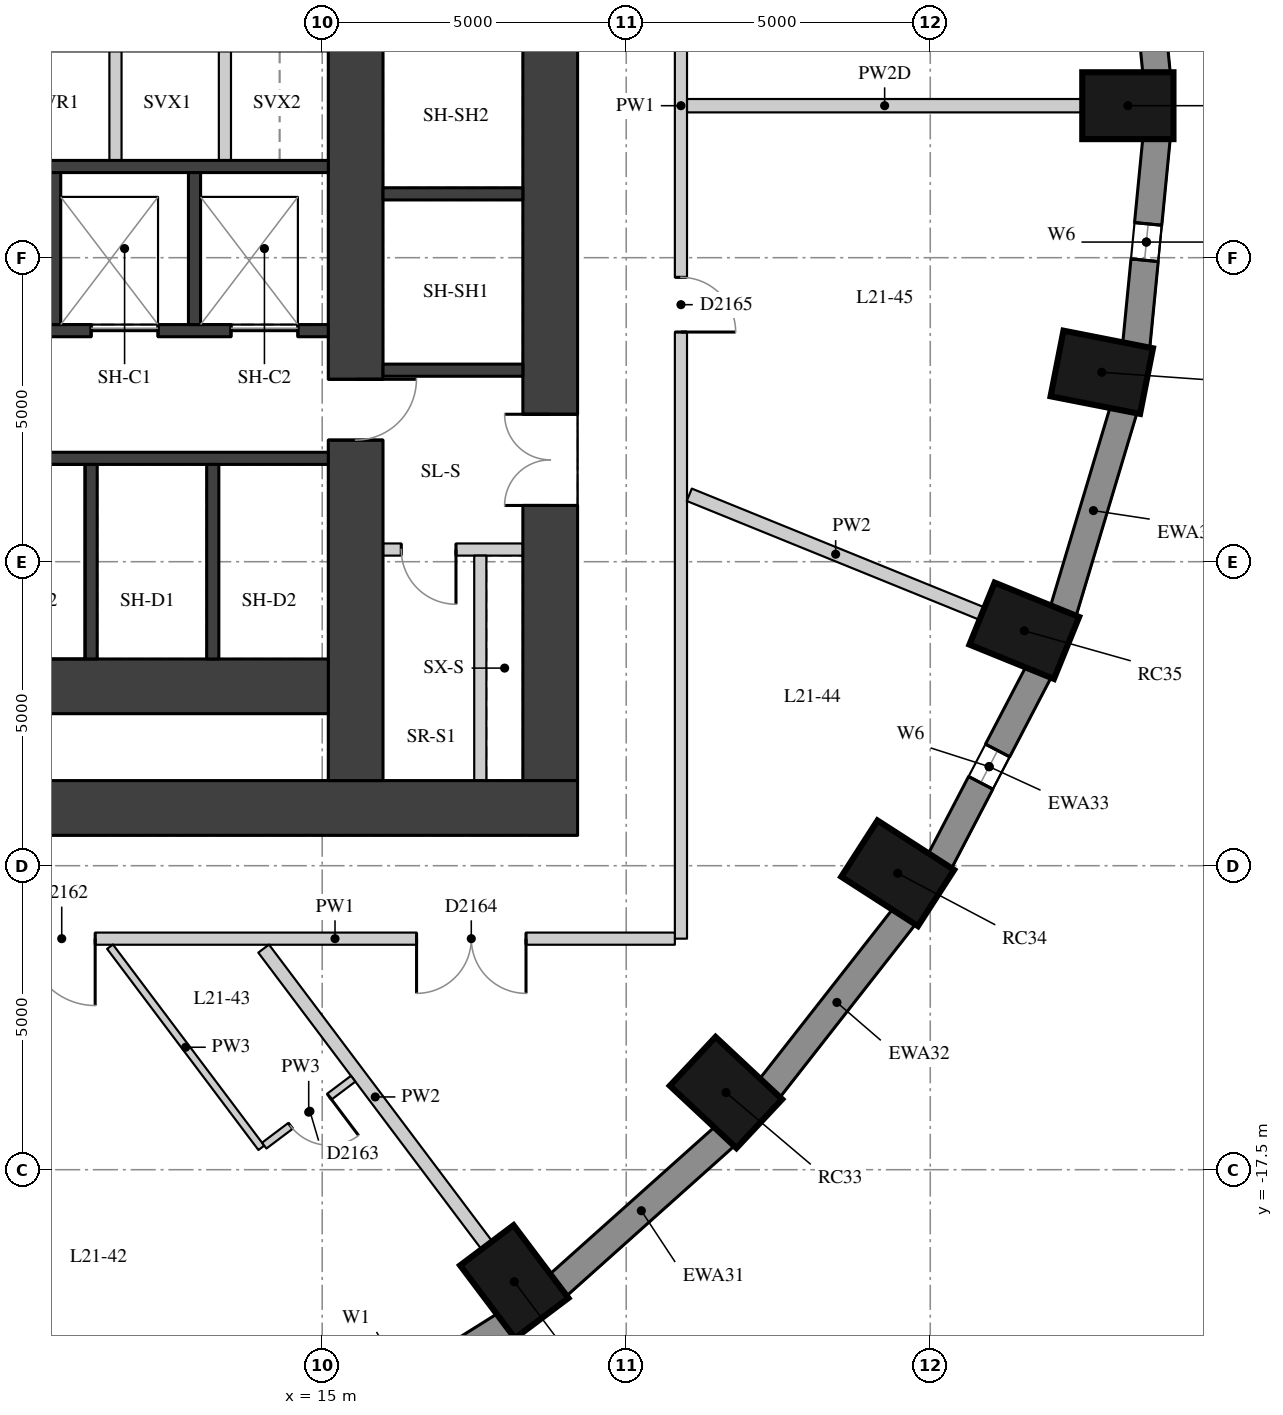
"""IFC4 building model, lengths in metres.
Left out: names, types, materials, properties, quantities, classifications, styles, units other than length and angle.
Written with IfcOpenShell. Run it as: python <this file> out.ifc"""

import sys

from ifc_helpers import new_model, si_unit, direction, frame, frame_2d, origin, origin_2d, place, context, subcontext, project, spatial, rectangle, extrude, element, fill, save


model = new_model("IFC4")
c1 = context("Model", 3, precision=1e-05, world=origin(), true_north=direction((0.0, 1.0)))
c2 = subcontext(c1, "Body", "Model", "MODEL_VIEW")
j1 = project(units=[si_unit("LENGTHUNIT", "METRE"), si_unit("PLANEANGLEUNIT", "RADIAN")], contexts=[c1])
p1 = place(None, origin())
s1 = spatial("IfcSite", under=j1, at=p1, CompositionType="ELEMENT")
p2 = place(p1, origin())
s2 = spatial("IfcBuilding", under=s1, at=p2, CompositionType="ELEMENT")
p3 = place(p2, frame((0.0, 0.0, 77.8)))
s3 = spatial("IfcBuildingStorey", under=s2, at=p3, CompositionType="ELEMENT", Elevation=77.8)
for number, where, z_axis, x_axis in (
    (1, (28.25, 0.0, 0.0), (0.0, 0.0, 1.0), (1.0, 0.0, 0.0)),
    (2, (18.159, -19.343, 0.0), (0.0, 0.0, 1.0), (0.601, -0.799, 0.0)),
    (3, (21.641, -16.23, 0.0), (0.0, 0.0, 1.0), (0.73, -0.683, 0.0)),
    (4, (24.465, -12.625, 0.0), (0.0, 0.0, 1.0), (0.841, -0.541, 0.0)),
    (5, (26.546, -8.636, 0.0), (0.0, 0.0, 1.0), (0.927, -0.376, 0.0)),
    (6, (27.821, -4.385, 0.0), (0.0, 0.0, 1.0), (0.981, -0.193, 0.0)),
):
    element("IfcColumn", number, at=place(p3, frame(where, z_axis=z_axis, x_axis=x_axis)), inside=s3, PredefinedType="COLUMN", context=c2, shape_type="SweptSolid", body=[
        extrude(rectangle(XDim=1.5, YDim=1.1, at=origin_2d()), origin(), (0.0, 0.0, 1.0), 3.3),
    ])
p4 = place(p3, frame((28.722, 0.53, 0.0), z_axis=(0.0, 0.0, 1.0), x_axis=(-0.097389581596, 0.995246336038, 0.0)))
e7 = element("IfcWall", 7, at=p4, inside=s3, PredefinedType="SOLIDWALL", context=c2, shape_type="SweptSolid", body=[
    extrude(rectangle(XDim=3.442, YDim=0.45, at=frame_2d((1.721, 0.0))), origin(), (0.0, 0.0, 1.0), 3.02),
])
p5 = place(p3, frame((14.817, -22.051, 0.0), z_axis=(0.0, 0.0, 1.0), x_axis=(0.847635480093, 0.530579016629, 0.0)))
e8 = element("IfcWall", 8, at=p5, inside=s3, PredefinedType="SOLIDWALL", context=c2, shape_type="SweptSolid", body=[
    extrude(rectangle(XDim=3.782, YDim=0.45, at=frame_2d((1.891, 0.0))), origin(), (0.0, 0.0, 1.0), 3.02),
])
p6 = place(p5, frame((0.791, 0.0, 0.4)))
e9 = element("IfcOpeningElement", 9, at=p6, cuts=e8, PredefinedType="OPENING", context=c2, shape_type="SweptSolid", body=[
    extrude(rectangle(XDim=2.2, YDim=1.75, at=frame_2d((1.1, 0.875))), frame((0.0, 0.235, 0.0), z_axis=(0.0, -1.0, 0.0), x_axis=(1.0, 0.0, 0.0)), (0.0, 0.0, 1.0), 0.47),
])
p7 = place(p3, frame((18.871, -19.407, 0.0), z_axis=(0.0, 0.0, 1.0), x_axis=(0.745526233716, 0.66647628228, 0.0)))
e10 = element("IfcWall", 10, at=p7, inside=s3, PredefinedType="SOLIDWALL", context=c2, shape_type="SweptSolid", body=[
    extrude(rectangle(XDim=3.697, YDim=0.45, at=frame_2d((1.848, 0.0))), origin(), (0.0, 0.0, 1.0), 3.02),
])
p8 = place(p3, frame((22.352, -16.17, 0.0), z_axis=(0.0, 0.0, 1.0), x_axis=(0.616661975264, 0.787228053529, 0.0)))
e11 = element("IfcWall", 11, at=p8, inside=s3, PredefinedType="SOLIDWALL", context=c2, shape_type="SweptSolid", body=[
    extrude(rectangle(XDim=3.61, YDim=0.45, at=frame_2d((1.805, 0.0))), origin(), (0.0, 0.0, 1.0), 3.02),
])
p9 = place(p3, frame((25.152, -12.437, 0.0), z_axis=(0.0, 0.0, 1.0), x_axis=(0.462492775226, 0.886623050041, 0.0)))
e12 = element("IfcWall", 12, at=p9, inside=s3, PredefinedType="SOLIDWALL", context=c2, shape_type="SweptSolid", body=[
    extrude(rectangle(XDim=3.532, YDim=0.45, at=frame_2d((1.766, 0.0))), origin(), (0.0, 0.0, 1.0), 3.02),
])
p10 = place(p9, frame((1.466, 0.0, 0.4)))
e13 = element("IfcOpeningElement", 13, at=p10, cuts=e12, PredefinedType="OPENING", context=c2, shape_type="SweptSolid", body=[
    extrude(rectangle(XDim=0.6, YDim=1.75, at=frame_2d((0.3, 0.875))), frame((0.0, 0.235, 0.0), z_axis=(0.0, -1.0, 0.0), x_axis=(1.0, 0.0, 0.0)), (0.0, 0.0, 1.0), 0.47),
])
p11 = place(p3, frame((27.185, -8.323, 0.0), z_axis=(0.0, 0.0, 1.0), x_axis=(0.287064133733, 0.957911364963, 0.0)))
e14 = element("IfcWall", 14, at=p11, inside=s3, PredefinedType="SOLIDWALL", context=c2, shape_type="SweptSolid", body=[
    extrude(rectangle(XDim=3.473, YDim=0.45, at=frame_2d((1.737, 0.0))), origin(), (0.0, 0.0, 1.0), 3.02),
])
p12 = place(p3, frame((28.387, -3.956, 0.0), z_axis=(0.0, 0.0, 1.0), x_axis=(0.097389581596, 0.995246336038, 0.0)))
e15 = element("IfcWall", 15, at=p12, inside=s3, PredefinedType="SOLIDWALL", context=c2, shape_type="SweptSolid", body=[
    extrude(rectangle(XDim=3.442, YDim=0.45, at=frame_2d((1.721, 0.0))), origin(), (0.0, 0.0, 1.0), 3.02),
])
p13 = place(p12, frame((1.421, 0.0, 0.4)))
e16 = element("IfcOpeningElement", 16, at=p13, cuts=e15, PredefinedType="OPENING", context=c2, shape_type="SweptSolid", body=[
    extrude(rectangle(XDim=0.6, YDim=1.75, at=frame_2d((0.3, 0.875))), frame((0.0, 0.235, 0.0), z_axis=(0.0, -1.0, 0.0), x_axis=(1.0, 0.0, 0.0)), (0.0, 0.0, 1.0), 0.47),
])
p14 = place(p3, frame((18.75, -11.1, 0.0), z_axis=(0.0, 0.0, 1.0), x_axis=(0.0, 1.0, 0.0)))
e17 = element("IfcWall", 17, at=p14, inside=s3, PredefinedType="SHEAR", context=c2, shape_type="SweptSolid", body=[
    extrude(rectangle(XDim=22.2, YDim=0.9, at=frame_2d((11.1, 0.0))), origin(), (0.0, 0.0, 1.0), 3.02),
])
p15 = place(p14, frame((15.925, 0.0, 0.0)))
e18 = element("IfcOpeningElement", 18, at=p15, cuts=e17, PredefinedType="OPENING", context=c2, shape_type="SweptSolid", body=[
    extrude(rectangle(XDim=1.5, YDim=2.1, at=frame_2d((0.75, 1.05))), frame((0.0, 0.46, 0.0), z_axis=(0.0, -1.0, 0.0), x_axis=(1.0, 0.0, 0.0)), (0.0, 0.0, 1.0), 0.92),
])
p16 = place(p14, frame((4.525, 0.0, 0.0)))
e19 = element("IfcOpeningElement", 19, at=p16, cuts=e17, PredefinedType="OPENING", context=c2, shape_type="SweptSolid", body=[
    extrude(rectangle(XDim=1.5, YDim=2.1, at=frame_2d((0.75, 1.05))), frame((0.0, 0.46, 0.0), z_axis=(0.0, -1.0, 0.0), x_axis=(1.0, 0.0, 0.0)), (0.0, 0.0, 1.0), 0.92),
])
p17 = place(p3, frame((4.0, -11.55, 0.0), z_axis=(0.0, 0.0, 1.0), x_axis=(1.0, 0.0, 0.0)))
e20 = element("IfcWall", 20, at=p17, inside=s3, PredefinedType="SHEAR", context=c2, shape_type="SweptSolid", body=[
    extrude(rectangle(XDim=15.2, YDim=0.9, at=frame_2d((7.6, 0.0))), origin(), (0.0, 0.0, 1.0), 3.02),
])
p18 = place(p3, frame((15.55, -11.1, 0.0), z_axis=(0.0, 0.0, 1.0), x_axis=(0.0, 1.0, 0.0)))
e21 = element("IfcWall", 21, at=p18, inside=s3, PredefinedType="SHEAR", context=c2, shape_type="SweptSolid", body=[
    extrude(rectangle(XDim=22.2, YDim=0.9, at=frame_2d((11.1, 0.0))), origin(), (0.0, 0.0, 1.0), 3.02),
])
p19 = place(p18, frame((15.6, 0.0, 0.0)))
e22 = element("IfcOpeningElement", 22, at=p19, cuts=e21, PredefinedType="OPENING", context=c2, shape_type="SweptSolid", body=[
    extrude(rectangle(XDim=1.0, YDim=2.1, at=frame_2d((0.5, 1.05))), frame((0.0, 0.46, 0.0), z_axis=(0.0, -1.0, 0.0), x_axis=(1.0, 0.0, 0.0)), (0.0, 0.0, 1.0), 0.92),
])
p20 = place(p18, frame((5.6, 0.0, 0.0)))
e23 = element("IfcOpeningElement", 23, at=p20, cuts=e21, PredefinedType="OPENING", context=c2, shape_type="SweptSolid", body=[
    extrude(rectangle(XDim=1.0, YDim=2.1, at=frame_2d((0.5, 1.05))), frame((0.0, 0.46, 0.0), z_axis=(0.0, -1.0, 0.0), x_axis=(1.0, 0.0, 0.0)), (0.0, 0.0, 1.0), 0.92),
])
p21 = place(p3, frame((4.9, -9.55, 0.0), z_axis=(0.0, 0.0, 1.0), x_axis=(1.0, 0.0, 0.0)))
e24 = element("IfcWall", 24, at=p21, inside=s3, PredefinedType="SHEAR", context=c2, shape_type="SweptSolid", body=[
    extrude(rectangle(XDim=10.2, YDim=0.9, at=frame_2d((5.1, 0.0))), origin(), (0.0, 0.0, 1.0), 3.02),
])
p22 = place(p3, frame((4.9, -1.0, 0.0), z_axis=(0.0, 0.0, 1.0), x_axis=(1.0, 0.0, 0.0)))
e25 = element("IfcWall", 25, at=p22, inside=s3, PredefinedType="SHEAR", context=c2, shape_type="SweptSolid", body=[
    extrude(rectangle(XDim=10.2, YDim=0.2, at=frame_2d((5.1, 0.0))), origin(), (0.0, 0.0, 1.0), 3.02),
])
p23 = place(p3, frame((4.9, -3.7, 0.0), z_axis=(0.0, 0.0, 1.0), x_axis=(1.0, 0.0, 0.0)))
e26 = element("IfcWall", 26, at=p23, inside=s3, PredefinedType="SHEAR", context=c2, shape_type="SweptSolid", body=[
    extrude(rectangle(XDim=10.2, YDim=0.2, at=frame_2d((5.1, 0.0))), origin(), (0.0, 0.0, 1.0), 3.02),
])
p24 = place(p23, frame((6.3, 0.0, 0.0)))
e27 = element("IfcOpeningElement", 27, at=p24, cuts=e26, PredefinedType="OPENING", context=c2, shape_type="SweptSolid", body=[
    extrude(rectangle(XDim=1.1, YDim=2.1, at=frame_2d((0.55, 1.05))), frame((0.0, 0.11, 0.0), z_axis=(0.0, -1.0, 0.0), x_axis=(1.0, 0.0, 0.0)), (0.0, 0.0, 1.0), 0.22),
])
p25 = place(p23, frame((8.6, 0.0, 0.0)))
e28 = element("IfcOpeningElement", 28, at=p25, cuts=e26, PredefinedType="OPENING", context=c2, shape_type="SweptSolid", body=[
    extrude(rectangle(XDim=1.1, YDim=2.1, at=frame_2d((0.55, 1.05))), frame((0.0, 0.11, 0.0), z_axis=(0.0, -1.0, 0.0), x_axis=(1.0, 0.0, 0.0)), (0.0, 0.0, 1.0), 0.22),
])
p26 = place(p3, frame((4.9, -5.8, 0.0), z_axis=(0.0, 0.0, 1.0), x_axis=(1.0, 0.0, 0.0)))
e29 = element("IfcWall", 29, at=p26, inside=s3, PredefinedType="SHEAR", context=c2, shape_type="SweptSolid", body=[
    extrude(rectangle(XDim=10.2, YDim=0.2, at=frame_2d((5.1, 0.0))), origin(), (0.0, 0.0, 1.0), 3.02),
])
for number, where, z_axis, x_axis in (
    (30, (11.2, -9.1, 0.0), (0.0, 0.0, 1.0), (0.0, 1.0, 0.0)),
    (31, (13.2, -9.1, 0.0), (0.0, 0.0, 1.0), (0.0, 1.0, 0.0)),
):
    element("IfcWall", number, at=place(p3, frame(where, z_axis=z_axis, x_axis=x_axis)), inside=s3, PredefinedType="SHEAR", context=c2, shape_type="SweptSolid", body=[
        extrude(rectangle(XDim=3.2, YDim=0.2, at=frame_2d((1.6, 0.0))), origin(), (0.0, 0.0, 1.0), 3.02),
    ])
for number, where, z_axis, x_axis in (
    (32, (10.6, -3.6, 0.0), (0.0, 0.0, 1.0), (0.0, 1.0, 0.0)),
    (33, (12.9, -3.6, 0.0), (0.0, 0.0, 1.0), (0.0, 1.0, 0.0)),
):
    element("IfcWall", number, at=place(p3, frame(where, z_axis=z_axis, x_axis=x_axis)), inside=s3, PredefinedType="SHEAR", context=c2, shape_type="SweptSolid", body=[
        extrude(rectangle(XDim=2.5, YDim=0.2, at=frame_2d((1.25, 0.0))), origin(), (0.0, 0.0, 1.0), 3.02),
    ])
for number, where, z_axis, x_axis in (
    (34, (11.6, -0.9, 0.0), (0.0, 0.0, 1.0), (0.0, 1.0, 0.0)),
    (35, (13.4, -0.9, 0.0), (0.0, 0.0, 1.0), (0.0, 1.0, 0.0)),
):
    element("IfcWall", number, at=place(p3, frame(where, z_axis=z_axis, x_axis=x_axis)), inside=s3, PredefinedType="PARTITIONING", context=c2, shape_type="SweptSolid", body=[
        extrude(rectangle(XDim=1.8, YDim=0.2, at=frame_2d((0.9, 0.0))), origin(), (0.0, 0.0, 1.0), 3.02),
    ])
for number, where, z_axis, x_axis in (
    (36, (16.0, -4.35, 0.0), (0.0, 0.0, 1.0), (1.0, 0.0, 0.0)),
    (37, (16.0, -1.45, 0.0), (0.0, 0.0, 1.0), (1.0, 0.0, 0.0)),
):
    element("IfcWall", number, at=place(p3, frame(where, z_axis=z_axis, x_axis=x_axis)), inside=s3, PredefinedType="SHEAR", context=c2, shape_type="SweptSolid", body=[
        extrude(rectangle(XDim=2.3, YDim=0.2, at=frame_2d((1.15, 0.0))), origin(), (0.0, 0.0, 1.0), 3.02),
    ])
p27 = place(p3, frame((16.0, -7.3, 0.0), z_axis=(0.0, 0.0, 1.0), x_axis=(1.0, 0.0, 0.0)))
e38 = element("IfcWall", 38, at=p27, inside=s3, PredefinedType="PARTITIONING", context=c2, shape_type="SweptSolid", body=[
    extrude(rectangle(XDim=2.3, YDim=0.2, at=frame_2d((1.15, 0.0))), origin(), (0.0, 0.0, 1.0), 3.02),
])
p28 = place(p27, frame((0.3, 0.0, 0.0)))
e39 = element("IfcOpeningElement", 39, at=p28, cuts=e38, PredefinedType="OPENING", context=c2, shape_type="SweptSolid", body=[
    extrude(rectangle(XDim=0.9, YDim=2.1, at=frame_2d((0.45, 1.05))), frame((0.0, 0.11, 0.0), z_axis=(0.0, -1.0, 0.0), x_axis=(1.0, 0.0, 0.0)), (0.0, 0.0, 1.0), 0.22),
])
p29 = place(p3, frame((17.6, -11.1, 0.0), z_axis=(0.0, 0.0, 1.0), x_axis=(0.0, 1.0, 0.0)))
e40 = element("IfcWall", 40, at=p29, inside=s3, PredefinedType="PARTITIONING", context=c2, shape_type="SweptSolid", body=[
    extrude(rectangle(XDim=3.7, YDim=0.2, at=frame_2d((1.85, 0.0))), origin(), (0.0, 0.0, 1.0), 3.02),
])
p30 = place(p3, frame((20.9, 13.7, 0.0), z_axis=(0.0, 0.0, 1.0), x_axis=(0.0, -1.0, 0.0)))
e41 = element("IfcWall", 41, at=p30, inside=s3, PredefinedType="PARTITIONING", context=c2, shape_type="SweptSolid", body=[
    extrude(rectangle(XDim=27.4, YDim=0.2, at=frame_2d((13.7, 0.0))), origin(), (0.0, 0.0, 1.0), 3.02),
])
p31 = place(p30, frame((16.523, 0.0, 0.0)))
e42 = element("IfcOpeningElement", 42, at=p31, cuts=e41, PredefinedType="OPENING", context=c2, shape_type="SweptSolid", body=[
    extrude(rectangle(XDim=0.9, YDim=2.1, at=frame_2d((0.45, 1.05))), frame((0.0, 0.11, 0.0), z_axis=(0.0, -1.0, 0.0), x_axis=(1.0, 0.0, 0.0)), (0.0, 0.0, 1.0), 0.22),
])
p32 = place(p30, frame((7.635, 0.0, 0.0)))
e43 = element("IfcOpeningElement", 43, at=p32, cuts=e41, PredefinedType="OPENING", context=c2, shape_type="SweptSolid", body=[
    extrude(rectangle(XDim=1.8, YDim=2.1, at=frame_2d((0.9, 1.05))), frame((0.0, 0.11, 0.0), z_axis=(0.0, -1.0, 0.0), x_axis=(1.0, 0.0, 0.0)), (0.0, 0.0, 1.0), 0.22),
])
p33 = place(p3, frame((20.8, -13.7, 0.0), z_axis=(0.0, 0.0, 1.0), x_axis=(-1.0, 0.0, 0.0)))
e44 = element("IfcWall", 44, at=p33, inside=s3, PredefinedType="PARTITIONING", context=c2, shape_type="SweptSolid", body=[
    extrude(rectangle(XDim=11.178, YDim=0.2, at=frame_2d((5.589, 0.0))), origin(), (0.0, 0.0, 1.0), 3.02),
])
p34 = place(p33, frame((9.534, 0.0, 0.0)))
e45 = element("IfcOpeningElement", 45, at=p34, cuts=e44, PredefinedType="OPENING", context=c2, shape_type="SweptSolid", body=[
    extrude(rectangle(XDim=1.1, YDim=2.1, at=frame_2d((0.55, 1.05))), frame((0.0, 0.11, 0.0), z_axis=(0.0, -1.0, 0.0), x_axis=(1.0, 0.0, 0.0)), (0.0, 0.0, 1.0), 0.22),
])
p35 = place(p33, frame((2.448, 0.0, 0.0)))
e46 = element("IfcOpeningElement", 46, at=p35, cuts=e44, PredefinedType="OPENING", context=c2, shape_type="SweptSolid", body=[
    extrude(rectangle(XDim=1.8, YDim=2.1, at=frame_2d((0.9, 1.05))), frame((0.0, 0.11, 0.0), z_axis=(0.0, -1.0, 0.0), x_axis=(1.0, 0.0, 0.0)), (0.0, 0.0, 1.0), 0.22),
])
p36 = place(p3, frame((27.5, 0.0, 0.0), z_axis=(0.0, 0.0, 1.0), x_axis=(-1.0, 0.0, 0.0)))
e47 = element("IfcWall", 47, at=p36, inside=s3, PredefinedType="PARTITIONING", context=c2, shape_type="SweptSolid", body=[
    extrude(rectangle(XDim=6.5, YDim=0.22, at=frame_2d((3.25, 0.0))), origin(), (0.0, 0.0, 1.0), 2.47),
])
p37 = place(p3, frame((17.708, -18.743, 0.0), z_axis=(0.0, 0.0, 1.0), x_axis=(-0.601170031872, 0.799121137738, 0.0)))
e48 = element("IfcWall", 48, at=p37, inside=s3, PredefinedType="PARTITIONING", context=c2, shape_type="SweptSolid", body=[
    extrude(rectangle(XDim=6.106, YDim=0.22, at=frame_2d((3.053, 0.0))), origin(), (0.0, 0.0, 1.0), 3.02),
])
p38 = place(p3, frame((25.851, -8.354, 0.0), z_axis=(0.0, 0.0, 1.0), x_axis=(-0.926545919269, 0.376181684145, 0.0)))
e49 = element("IfcWall", 49, at=p38, inside=s3, PredefinedType="PARTITIONING", context=c2, shape_type="SweptSolid", body=[
    extrude(rectangle(XDim=5.196, YDim=0.22, at=frame_2d((2.598, 0.0))), origin(), (0.0, 0.0, 1.0), 3.02),
])
p39 = place(p3, frame((11.51, -13.832, 0.0), z_axis=(0.0, 0.0, 1.0), x_axis=(0.60115060605, -0.7991357512, 0.0)))
e50 = element("IfcWall", 50, at=p39, inside=s3, PredefinedType="PARTITIONING", context=c2, shape_type="SweptSolid", body=[
    extrude(rectangle(XDim=4.14, YDim=0.12, at=frame_2d((2.07, 0.0))), origin(), (0.0, 0.0, 1.0), 3.02),
])
p40 = place(p3, frame((14.047, -17.104, 0.0), z_axis=(0.0, 0.0, 1.0), x_axis=(0.799182868338, 0.601087966071, 0.0)))
e51 = element("IfcWall", 51, at=p40, inside=s3, PredefinedType="PARTITIONING", context=c2, shape_type="SweptSolid", body=[
    extrude(rectangle(XDim=1.83, YDim=0.12, at=frame_2d((0.915, 0.0))), origin(), (0.0, 0.0, 1.0), 3.02),
])
p41 = place(p40, frame((0.54, 0.0, 0.0)))
e52 = element("IfcOpeningElement", 52, at=p41, cuts=e51, PredefinedType="OPENING", context=c2, shape_type="SweptSolid", body=[
    extrude(rectangle(XDim=0.8, YDim=2.1, at=frame_2d((0.4, 1.05))), frame((0.0, 0.07, 0.0), z_axis=(0.0, -1.0, 0.0), x_axis=(1.0, 0.0, 0.0)), (0.0, 0.0, 1.0), 0.14),
])
p42 = place(p10, origin())
e53 = element("IfcWindow", 53, at=p42, inside=s3, PartitioningType="SINGLE_PANEL", PredefinedType="WINDOW", context=c2, shape_type="SweptSolid", body=[
    extrude(rectangle(XDim=0.6, YDim=1.75, at=frame_2d((0.3, 0.875))), frame((0.0, 0.035, 0.0), z_axis=(0.0, -1.0, 0.0), x_axis=(1.0, 0.0, 0.0)), (0.0, 0.0, 1.0), 0.06),
])
fill(e13, e53)
p43 = place(p13, origin())
e54 = element("IfcWindow", 54, at=p43, inside=s3, PartitioningType="SINGLE_PANEL", PredefinedType="WINDOW", context=c2, shape_type="SweptSolid", body=[
    extrude(rectangle(XDim=0.6, YDim=1.75, at=frame_2d((0.3, 0.875))), frame((0.0, 0.035, 0.0), z_axis=(0.0, -1.0, 0.0), x_axis=(1.0, 0.0, 0.0)), (0.0, 0.0, 1.0), 0.06),
])
fill(e16, e54)
p44 = place(p16, origin())
e55 = element("IfcDoor", 55, at=p44, inside=s3, OperationType="DOUBLE_DOOR_SINGLE_SWING", PredefinedType="DOOR", context=c2, shape_type="SweptSolid", body=[
    extrude(rectangle(XDim=1.5, YDim=2.1, at=frame_2d((0.75, 1.05))), frame((0.0, 0.025, 0.0), z_axis=(0.0, -1.0, 0.0), x_axis=(1.0, 0.0, 0.0)), (0.0, 0.0, 1.0), 0.05),
])
fill(e19, e55)
p45 = place(p24, origin())
e56 = element("IfcDoor", 56, at=p45, inside=s3, OperationType="DOUBLE_DOOR_SLIDING", PredefinedType="DOOR", context=c2, shape_type="SweptSolid", body=[
    extrude(rectangle(XDim=1.1, YDim=2.1, at=frame_2d((0.55, 1.05))), frame((0.0, 0.025, 0.0), z_axis=(0.0, -1.0, 0.0), x_axis=(1.0, 0.0, 0.0)), (0.0, 0.0, 1.0), 0.05),
])
fill(e27, e56)
p46 = place(p25, origin())
e57 = element("IfcDoor", 57, at=p46, inside=s3, OperationType="DOUBLE_DOOR_SLIDING", PredefinedType="DOOR", context=c2, shape_type="SweptSolid", body=[
    extrude(rectangle(XDim=1.1, YDim=2.1, at=frame_2d((0.55, 1.05))), frame((0.0, 0.025, 0.0), z_axis=(0.0, -1.0, 0.0), x_axis=(1.0, 0.0, 0.0)), (0.0, 0.0, 1.0), 0.05),
])
fill(e28, e57)
p47 = place(p20, origin())
e58 = element("IfcDoor", 58, at=p47, inside=s3, OperationType="SINGLE_SWING_LEFT", PredefinedType="DOOR", context=c2, shape_type="SweptSolid", body=[
    extrude(rectangle(XDim=1.0, YDim=2.1, at=frame_2d((0.5, 1.05))), frame((0.0, 0.025, 0.0), z_axis=(0.0, -1.0, 0.0), x_axis=(1.0, 0.0, 0.0)), (0.0, 0.0, 1.0), 0.05),
])
fill(e23, e58)
p48 = place(p28, origin())
e59 = element("IfcDoor", 59, at=p48, inside=s3, OperationType="SINGLE_SWING_LEFT", PredefinedType="DOOR", context=c2, shape_type="SweptSolid", body=[
    extrude(rectangle(XDim=0.9, YDim=2.1, at=frame_2d((0.45, 1.05))), frame((0.0, 0.025, 0.0), z_axis=(0.0, -1.0, 0.0), x_axis=(1.0, 0.0, 0.0)), (0.0, 0.0, 1.0), 0.05),
])
fill(e39, e59)
p49 = place(p34, origin())
e60 = element("IfcDoor", 60, at=p49, inside=s3, OperationType="SINGLE_SWING_LEFT", PredefinedType="DOOR", context=c2, shape_type="SweptSolid", body=[
    extrude(rectangle(XDim=1.1, YDim=2.1, at=frame_2d((0.55, 1.05))), frame((0.0, 0.025, 0.0), z_axis=(0.0, -1.0, 0.0), x_axis=(1.0, 0.0, 0.0)), (0.0, 0.0, 1.0), 0.05),
])
fill(e45, e60)
p50 = place(p41, origin())
e61 = element("IfcDoor", 61, at=p50, inside=s3, OperationType="SINGLE_SWING_LEFT", PredefinedType="DOOR", context=c2, shape_type="SweptSolid", body=[
    extrude(rectangle(XDim=0.8, YDim=2.1, at=frame_2d((0.4, 1.05))), frame((0.0, 0.025, 0.0), z_axis=(0.0, -1.0, 0.0), x_axis=(1.0, 0.0, 0.0)), (0.0, 0.0, 1.0), 0.05),
])
fill(e52, e61)
p51 = place(p35, origin())
e62 = element("IfcDoor", 62, at=p51, inside=s3, OperationType="DOUBLE_DOOR_SINGLE_SWING", PredefinedType="DOOR", context=c2, shape_type="SweptSolid", body=[
    extrude(rectangle(XDim=1.8, YDim=2.1, at=frame_2d((0.9, 1.05))), frame((0.0, 0.025, 0.0), z_axis=(0.0, -1.0, 0.0), x_axis=(1.0, 0.0, 0.0)), (0.0, 0.0, 1.0), 0.05),
])
fill(e46, e62)
p52 = place(p31, origin())
e63 = element("IfcDoor", 63, at=p52, inside=s3, OperationType="SINGLE_SWING_RIGHT", PredefinedType="DOOR", context=c2, shape_type="SweptSolid", body=[
    extrude(rectangle(XDim=0.9, YDim=2.1, at=frame_2d((0.45, 1.05))), frame((0.0, 0.025, 0.0), z_axis=(0.0, -1.0, 0.0), x_axis=(1.0, 0.0, 0.0)), (0.0, 0.0, 1.0), 0.05),
])
fill(e42, e63)
save(model, sys.argv[1])
